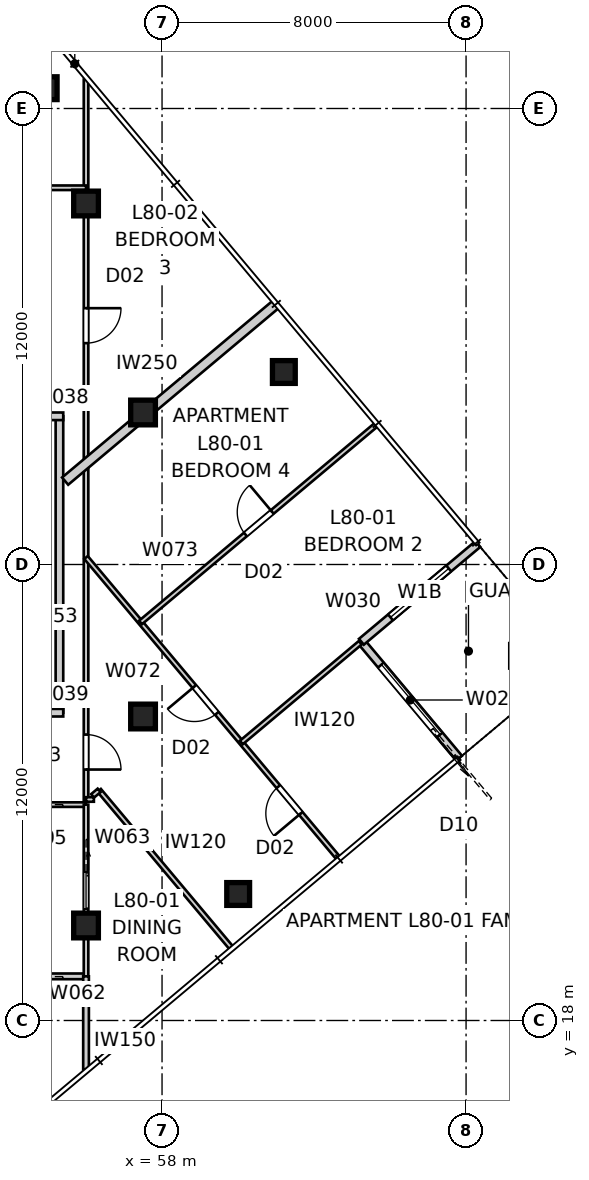
"""IFC4 building model, lengths in metres.
Left out: names, types, materials, properties, quantities, classifications, styles, units other than length and angle.
Written with IfcOpenShell. Run it as: python <this file> out.ifc"""

import sys

from ifc_helpers import new_model, si_unit, direction, frame, frame_2d, origin, origin_2d, place, context, subcontext, project, spatial, rectangle, extrude, element, fill, save


model = new_model("IFC4")
c1 = context("Model", 3, precision=1e-05, world=origin(), true_north=direction((0.0, 1.0)))
c2 = subcontext(c1, "Body", "Model", "MODEL_VIEW")
j1 = project(units=[si_unit("LENGTHUNIT", "METRE"), si_unit("PLANEANGLEUNIT", "RADIAN")], contexts=[c1])
p1 = place(None, origin())
s1 = spatial("IfcSite", under=j1, at=p1, CompositionType="ELEMENT")
p2 = place(p1, origin())
s2 = spatial("IfcBuilding", under=s1, at=p2, CompositionType="ELEMENT")
p3 = place(p2, frame((0.0, 0.0, 289.6)))
s3 = spatial("IfcBuildingStorey", under=s2, at=p3, CompositionType="ELEMENT", Elevation=289.6)
for number, where, z_axis, x_axis in (
    (1, (60.003, 21.329, 0.0), (0.0, 0.0, 1.0), (1.0, 0.0, 0.0)),
    (2, (61.205, 35.065, 0.0), (0.0, 0.0, 1.0), (1.0, 0.0, 0.0)),
    (3, (54.938, 42.534, 0.0), (0.0, 0.0, 1.0), (1.0, 0.0, 0.0)),
):
    element("IfcColumn", number, at=place(p3, frame(where, z_axis=z_axis, x_axis=x_axis)), inside=s3, PredefinedType="COLUMN", context=c2, shape_type="SweptSolid", body=[
        extrude(rectangle(XDim=0.6, YDim=0.6, at=origin_2d()), origin(), (0.0, 0.0, 1.0), 3.4),
    ])
for number, where, z_axis, x_axis in (
    (4, (57.5, 26.0, 0.0), (0.0, 0.0, 1.0), (1.0, 0.0, 0.0)),
    (5, (57.5, 34.0, 0.0), (0.0, 0.0, 1.0), (1.0, 0.0, 0.0)),
    (6, (56.0, 39.5, 0.0), (0.0, 0.0, 1.0), (1.0, 0.0, 0.0)),
    (7, (56.0, 20.5, 0.0), (0.0, 0.0, 1.0), (1.0, 0.0, 0.0)),
):
    element("IfcColumn", number, at=place(p3, frame(where, z_axis=z_axis, x_axis=x_axis)), inside=s3, PredefinedType="COLUMN", context=c2, shape_type="SweptSolid", body=[
        extrude(rectangle(XDim=0.65, YDim=0.65, at=origin_2d()), origin(), (0.0, 0.0, 1.0), 3.4),
    ])
p4 = place(p3, frame((65.817, 24.902, 0.0), z_axis=(0.0, 0.0, 1.0), x_axis=(-0.642768287094, 0.766060656284, 0.0)))
e8 = element("IfcWall", 8, at=p4, inside=s3, PredefinedType="SOLIDWALL", context=c2, shape_type="SweptSolid", body=[
    extrude(rectangle(XDim=4.0, YDim=0.2, at=frame_2d((2.0, 0.0))), origin(), (0.0, 0.0, 1.0), 3.25),
])
p5 = place(p4, frame((0.8, 0.0, 0.0)))
e9 = element("IfcOpeningElement", 9, at=p5, cuts=e8, PredefinedType="OPENING", context=c2, shape_type="SweptSolid", body=[
    extrude(rectangle(XDim=2.4, YDim=2.4, at=frame_2d((1.2, 1.2))), frame((0.0, 0.11, 0.0), z_axis=(0.0, -1.0, 0.0), x_axis=(1.0, 0.0, 0.0)), (0.0, 0.0, 1.0), 0.22),
])
p6 = place(p3, frame((63.246, 27.966, 0.0), z_axis=(0.0, 0.0, 1.0), x_axis=(0.766035437498, 0.642798342015, 0.0)))
e10 = element("IfcWall", 10, at=p6, inside=s3, PredefinedType="SOLIDWALL", context=c2, shape_type="SweptSolid", body=[
    extrude(rectangle(XDim=4.0, YDim=0.2, at=frame_2d((2.0, 0.0))), origin(), (0.0, 0.0, 1.0), 3.25),
])
p7 = place(p6, frame((1.0, 0.0, 0.45)))
e11 = element("IfcOpeningElement", 11, at=p7, cuts=e10, PredefinedType="OPENING", context=c2, shape_type="SweptSolid", body=[
    extrude(rectangle(XDim=2.0, YDim=1.8, at=frame_2d((1.0, 0.9))), frame((0.0, 0.11, 0.0), z_axis=(0.0, -1.0, 0.0), x_axis=(1.0, 0.0, 0.0)), (0.0, 0.0, 1.0), 0.22),
])
p8 = place(p3, frame((55.3, 26.1, 0.0), z_axis=(0.0, 0.0, 1.0), x_axis=(0.0, 1.0, 0.0)))
e12 = element("IfcWall", 12, at=p8, inside=s3, PredefinedType="PARTITIONING", context=c2, shape_type="SweptSolid", body=[
    extrude(rectangle(XDim=7.8, YDim=0.2, at=frame_2d((3.9, 0.0))), origin(), (0.0, 0.0, 1.0), 3.25),
])
p9 = place(p3, frame((52.1, 33.9, 0.0), z_axis=(0.0, 0.0, 1.0), x_axis=(1.0, 0.0, 0.0)))
e13 = element("IfcWall", 13, at=p9, inside=s3, PredefinedType="PARTITIONING", context=c2, shape_type="SweptSolid", body=[
    extrude(rectangle(XDim=3.3, YDim=0.2, at=frame_2d((1.65, 0.0))), origin(), (0.0, 0.0, 1.0), 3.25),
])
p10 = place(p9, frame((1.04, 0.0, 0.0)))
e14 = element("IfcOpeningElement", 14, at=p10, cuts=e13, PredefinedType="OPENING", context=c2, shape_type="SweptSolid", body=[
    extrude(rectangle(XDim=1.02, YDim=2.34, at=frame_2d((0.51, 1.17))), frame((0.0, 0.11, 0.0), z_axis=(0.0, -1.0, 0.0), x_axis=(1.0, 0.0, 0.0)), (0.0, 0.0, 1.0), 0.22),
])
p11 = place(p3, frame((52.1, 26.1, 0.0), z_axis=(0.0, 0.0, 1.0), x_axis=(1.0, 0.0, 0.0)))
e15 = element("IfcWall", 15, at=p11, inside=s3, PredefinedType="PARTITIONING", context=c2, shape_type="SweptSolid", body=[
    extrude(rectangle(XDim=3.3, YDim=0.2, at=frame_2d((1.65, 0.0))), origin(), (0.0, 0.0, 1.0), 3.25),
])
p12 = place(p11, frame((1.04, 0.0, 0.0)))
e16 = element("IfcOpeningElement", 16, at=p12, cuts=e15, PredefinedType="OPENING", context=c2, shape_type="SweptSolid", body=[
    extrude(rectangle(XDim=1.02, YDim=2.34, at=frame_2d((0.51, 1.17))), frame((0.0, 0.11, 0.0), z_axis=(0.0, -1.0, 0.0), x_axis=(1.0, 0.0, 0.0)), (0.0, 0.0, 1.0), 0.22),
])
p13 = place(p3, frame((61.007, 36.857, 0.0), z_axis=(0.0, 0.0, 1.0), x_axis=(-0.766054150891, -0.642776040237, 0.0)))
e17 = element("IfcWall", 17, at=p13, inside=s3, PredefinedType="PARTITIONING", context=c2, shape_type="SweptSolid", body=[
    extrude(rectangle(XDim=7.254, YDim=0.25, at=frame_2d((3.627, 0.0))), origin(), (0.0, 0.0, 1.0), 3.25),
])
p14 = place(p3, frame((56.0, 23.681, 0.0), z_axis=(0.0, 0.0, 1.0), x_axis=(-1.0, 0.0, 0.0)))
e18 = element("IfcWall", 18, at=p14, inside=s3, PredefinedType="PARTITIONING", context=c2, shape_type="SweptSolid", body=[
    extrude(rectangle(XDim=3.9, YDim=0.12, at=frame_2d((1.95, 0.0))), origin(), (0.0, 0.0, 1.0), 3.25),
])
p15 = place(p14, frame((1.47, 0.0, 0.0)))
e19 = element("IfcOpeningElement", 19, at=p15, cuts=e18, PredefinedType="OPENING", context=c2, shape_type="SweptSolid", body=[
    extrude(rectangle(XDim=0.96, YDim=2.1, at=frame_2d((0.48, 1.05))), frame((0.0, 0.07, 0.0), z_axis=(0.0, -1.0, 0.0), x_axis=(1.0, 0.0, 0.0)), (0.0, 0.0, 1.0), 0.14),
])
p16 = place(p3, frame((56.0, 42.762, 0.0), z_axis=(0.0, 0.0, 1.0), x_axis=(0.0, -1.0, 0.0)))
e20 = element("IfcWall", 20, at=p16, inside=s3, PredefinedType="PARTITIONING", context=c2, shape_type="SweptSolid", body=[
    extrude(rectangle(XDim=18.995, YDim=0.12, at=frame_2d((9.498, 0.0))), origin(), (0.0, 0.0, 1.0), 2.55),
])
p17 = place(p16, frame((17.238, 0.0, 0.0)))
e21 = element("IfcOpeningElement", 21, at=p17, cuts=e20, PredefinedType="OPENING", context=c2, shape_type="SweptSolid", body=[
    extrude(rectangle(XDim=0.92, YDim=2.34, at=frame_2d((0.46, 1.17))), frame((0.0, 0.07, 0.0), z_axis=(0.0, -1.0, 0.0), x_axis=(1.0, 0.0, 0.0)), (0.0, 0.0, 1.0), 0.14),
])
p18 = place(p16, frame((6.017, 0.0, 0.0)))
e22 = element("IfcOpeningElement", 22, at=p18, cuts=e20, PredefinedType="OPENING", context=c2, shape_type="SweptSolid", body=[
    extrude(rectangle(XDim=0.92, YDim=2.34, at=frame_2d((0.46, 1.17))), frame((0.0, 0.07, 0.0), z_axis=(0.0, -1.0, 0.0), x_axis=(1.0, 0.0, 0.0)), (0.0, 0.0, 1.0), 0.14),
])
p19 = place(p3, frame((56.0, 19.162, 0.0), z_axis=(0.0, 0.0, 1.0), x_axis=(-1.0, 0.0, 0.0)))
e23 = element("IfcWall", 23, at=p19, inside=s3, PredefinedType="SOLIDWALL", context=c2, shape_type="SweptSolid", body=[
    extrude(rectangle(XDim=3.9, YDim=0.15, at=frame_2d((1.95, 0.0))), origin(), (0.0, 0.0, 1.0), 3.25),
])
p20 = place(p19, frame((1.47, 0.0, 0.0)))
e24 = element("IfcOpeningElement", 24, at=p20, cuts=e23, PredefinedType="OPENING", context=c2, shape_type="SweptSolid", body=[
    extrude(rectangle(XDim=0.96, YDim=2.1, at=frame_2d((0.48, 1.05))), frame((0.0, 0.085, 0.0), z_axis=(0.0, -1.0, 0.0), x_axis=(1.0, 0.0, 0.0)), (0.0, 0.0, 1.0), 0.17),
])
p21 = place(p3, frame((56.0, 23.681, 0.0), z_axis=(0.0, 0.0, 1.0), x_axis=(0.0, -1.0, 0.0)))
e25 = element("IfcWall", 25, at=p21, inside=s3, PredefinedType="PARTITIONING", context=c2, shape_type="SweptSolid", body=[
    extrude(rectangle(XDim=4.519, YDim=0.12, at=frame_2d((2.26, 0.0))), origin(), (0.0, 0.0, 1.0), 2.55),
])
p22 = place(p21, frame((1.78, 0.0, 0.0)))
e26 = element("IfcOpeningElement", 26, at=p22, cuts=e25, PredefinedType="OPENING", context=c2, shape_type="SweptSolid", body=[
    extrude(rectangle(XDim=0.96, YDim=2.1, at=frame_2d((0.48, 1.05))), frame((0.0, 0.07, 0.0), z_axis=(0.0, -1.0, 0.0), x_axis=(1.0, 0.0, 0.0)), (0.0, 0.0, 1.0), 0.14),
])
p23 = place(p3, frame((56.0, 19.162, 0.0), z_axis=(0.0, 0.0, 1.0), x_axis=(0.0, -1.0, 0.0)))
e27 = element("IfcWall", 27, at=p23, inside=s3, PredefinedType="SOLIDWALL", context=c2, shape_type="SweptSolid", body=[
    extrude(rectangle(XDim=2.445, YDim=0.15, at=frame_2d((1.222, 0.0))), origin(), (0.0, 0.0, 1.0), 3.25),
])
p24 = place(p3, frame((62.631, 22.281, 0.0), z_axis=(0.0, 0.0, 1.0), x_axis=(-0.64277851249, 0.766052076481, 0.0)))
e28 = element("IfcWall", 28, at=p24, inside=s3, PredefinedType="PARTITIONING", context=c2, shape_type="SweptSolid", body=[
    extrude(rectangle(XDim=10.316, YDim=0.12, at=frame_2d((5.158, 0.0))), origin(), (0.0, 0.0, 1.0), 3.25),
])
p25 = place(p24, frame((4.962, 0.0, 0.0)))
e29 = element("IfcOpeningElement", 29, at=p25, cuts=e28, PredefinedType="OPENING", context=c2, shape_type="SweptSolid", body=[
    extrude(rectangle(XDim=0.92, YDim=2.34, at=frame_2d((0.46, 1.17))), frame((0.0, 0.07, 0.0), z_axis=(0.0, -1.0, 0.0), x_axis=(1.0, 0.0, 0.0)), (0.0, 0.0, 1.0), 0.14),
])
p26 = place(p24, frame((1.525, 0.0, 0.0)))
e30 = element("IfcOpeningElement", 30, at=p26, cuts=e28, PredefinedType="OPENING", context=c2, shape_type="SweptSolid", body=[
    extrude(rectangle(XDim=0.92, YDim=2.34, at=frame_2d((0.46, 1.17))), frame((0.0, 0.07, 0.0), z_axis=(0.0, -1.0, 0.0), x_axis=(1.0, 0.0, 0.0)), (0.0, 0.0, 1.0), 0.14),
])
p27 = place(p3, frame((57.434, 28.475, 0.0), z_axis=(0.0, 0.0, 1.0), x_axis=(0.766033729027, 0.642800378028, 0.0)))
e31 = element("IfcWall", 31, at=p27, inside=s3, PredefinedType="PARTITIONING", context=c2, shape_type="SweptSolid", body=[
    extrude(rectangle(XDim=8.085, YDim=0.12, at=frame_2d((4.042, 0.0))), origin(), (0.0, 0.0, 1.0), 3.25),
])
p28 = place(p27, frame((3.603, 0.0, 0.0)))
e32 = element("IfcOpeningElement", 32, at=p28, cuts=e31, PredefinedType="OPENING", context=c2, shape_type="SweptSolid", body=[
    extrude(rectangle(XDim=0.92, YDim=2.34, at=frame_2d((0.46, 1.17))), frame((0.0, 0.07, 0.0), z_axis=(0.0, -1.0, 0.0), x_axis=(1.0, 0.0, 0.0)), (0.0, 0.0, 1.0), 0.14),
])
p29 = place(p3, frame((63.215, 27.94, 0.0), z_axis=(0.0, 0.0, 1.0), x_axis=(-0.766036790562, -0.642796729538, 0.0)))
e33 = element("IfcWall", 33, at=p29, inside=s3, PredefinedType="PARTITIONING", context=c2, shape_type="SweptSolid", body=[
    extrude(rectangle(XDim=4.085, YDim=0.12, at=frame_2d((2.042, 0.0))), origin(), (0.0, 0.0, 1.0), 3.25),
])
p30 = place(p3, frame((59.816, 19.919, 0.0), z_axis=(0.0, 0.0, 1.0), x_axis=(-0.642773197476, 0.766056536168, 0.0)))
e34 = element("IfcWall", 34, at=p30, inside=s3, PredefinedType="PARTITIONING", context=c2, shape_type="SweptSolid", body=[
    extrude(rectangle(XDim=5.4, YDim=0.12, at=frame_2d((2.7, 0.0))), origin(), (0.0, 0.0, 1.0), 3.25),
])
p31 = place(p3, frame((56.345, 24.056, 0.0), z_axis=(0.0, 0.0, 1.0), x_axis=(-0.766260492227, -0.642530044474, 0.0)))
e35 = element("IfcWall", 35, at=p31, inside=s3, PredefinedType="PARTITIONING", context=c2, shape_type="SweptSolid", body=[
    extrude(rectangle(XDim=0.225, YDim=0.12, at=frame_2d((0.112, 0.0))), origin(), (0.0, 0.0, 1.0), 3.25),
])
p32 = place(p3, frame((56.207, 23.817, 0.0), z_axis=(0.0, 0.0, 1.0), x_axis=(-1.0, 0.0, 0.0)))
e36 = element("IfcWall", 36, at=p32, inside=s3, PredefinedType="PARTITIONING", context=c2, shape_type="SweptSolid", body=[
    extrude(rectangle(XDim=0.207, YDim=0.12, at=frame_2d((0.104, 0.0))), origin(), (0.0, 0.0, 1.0), 3.25),
])
p33 = place(p3, frame((52.163, 39.914, 0.0), z_axis=(0.0, 0.0, 1.0), x_axis=(1.0, 0.0, 0.0)))
e37 = element("IfcWall", 37, at=p33, inside=s3, PredefinedType="PARTITIONING", context=c2, shape_type="SweptSolid", body=[
    extrude(rectangle(XDim=3.837, YDim=0.12, at=frame_2d((1.918, 0.0))), origin(), (0.0, 0.0, 1.0), 3.25),
])
p34 = place(p33, frame((1.438, 0.0, 0.0)))
e38 = element("IfcOpeningElement", 38, at=p34, cuts=e37, PredefinedType="OPENING", context=c2, shape_type="SweptSolid", body=[
    extrude(rectangle(XDim=0.96, YDim=2.1, at=frame_2d((0.48, 1.05))), frame((0.0, 0.07, 0.0), z_axis=(0.0, -1.0, 0.0), x_axis=(1.0, 0.0, 0.0)), (0.0, 0.0, 1.0), 0.14),
])
p35 = place(p5, origin())
e39 = element("IfcDoor", 39, at=p35, inside=s3, OperationType="SLIDING_TO_LEFT", PredefinedType="DOOR", context=c2, shape_type="SweptSolid", body=[
    extrude(rectangle(XDim=2.4, YDim=2.4, at=frame_2d((1.2, 1.2))), frame((0.0, 0.025, 0.0), z_axis=(0.0, -1.0, 0.0), x_axis=(1.0, 0.0, 0.0)), (0.0, 0.0, 1.0), 0.05),
])
fill(e9, e39)
p36 = place(p7, origin())
e40 = element("IfcWindow", 40, at=p36, inside=s3, PartitioningType="SINGLE_PANEL", PredefinedType="WINDOW", context=c2, shape_type="SweptSolid", body=[
    extrude(rectangle(XDim=2.0, YDim=1.8, at=frame_2d((1.0, 0.9))), frame((0.0, 0.03, 0.0), z_axis=(0.0, -1.0, 0.0), x_axis=(1.0, 0.0, 0.0)), (0.0, 0.0, 1.0), 0.06),
])
fill(e11, e40)
p37 = place(p17, origin())
e41 = element("IfcDoor", 41, at=p37, inside=s3, OperationType="SINGLE_SWING_RIGHT", PredefinedType="DOOR", context=c2, shape_type="SweptSolid", body=[
    extrude(rectangle(XDim=0.92, YDim=2.34, at=frame_2d((0.46, 1.17))), frame((0.0, 0.025, 0.0), z_axis=(0.0, -1.0, 0.0), x_axis=(1.0, 0.0, 0.0)), (0.0, 0.0, 1.0), 0.05),
])
fill(e21, e41)
p38 = place(p18, origin())
e42 = element("IfcDoor", 42, at=p38, inside=s3, OperationType="SINGLE_SWING_LEFT", PredefinedType="DOOR", context=c2, shape_type="SweptSolid", body=[
    extrude(rectangle(XDim=0.92, YDim=2.34, at=frame_2d((0.46, 1.17))), frame((0.0, 0.025, 0.0), z_axis=(0.0, -1.0, 0.0), x_axis=(1.0, 0.0, 0.0)), (0.0, 0.0, 1.0), 0.05),
])
fill(e22, e42)
p39 = place(p22, origin())
e43 = element("IfcDoor", 43, at=p39, inside=s3, OperationType="SLIDING_TO_LEFT", PredefinedType="DOOR", context=c2, shape_type="SweptSolid", body=[
    extrude(rectangle(XDim=0.96, YDim=2.1, at=frame_2d((0.48, 1.05))), frame((0.0, 0.025, 0.0), z_axis=(0.0, -1.0, 0.0), x_axis=(1.0, 0.0, 0.0)), (0.0, 0.0, 1.0), 0.05),
])
fill(e26, e43)
p40 = place(p25, origin())
e44 = element("IfcDoor", 44, at=p40, inside=s3, OperationType="SINGLE_SWING_RIGHT", PredefinedType="DOOR", context=c2, shape_type="SweptSolid", body=[
    extrude(rectangle(XDim=0.92, YDim=2.34, at=frame_2d((0.46, 1.17))), frame((0.0, 0.025, 0.0), z_axis=(0.0, -1.0, 0.0), x_axis=(1.0, 0.0, 0.0)), (0.0, 0.0, 1.0), 0.05),
])
fill(e29, e44)
p41 = place(p26, origin())
e45 = element("IfcDoor", 45, at=p41, inside=s3, OperationType="SINGLE_SWING_LEFT", PredefinedType="DOOR", context=c2, shape_type="SweptSolid", body=[
    extrude(rectangle(XDim=0.92, YDim=2.34, at=frame_2d((0.46, 1.17))), frame((0.0, 0.025, 0.0), z_axis=(0.0, -1.0, 0.0), x_axis=(1.0, 0.0, 0.0)), (0.0, 0.0, 1.0), 0.05),
])
fill(e30, e45)
p42 = place(p28, origin())
e46 = element("IfcDoor", 46, at=p42, inside=s3, OperationType="SINGLE_SWING_RIGHT", PredefinedType="DOOR", context=c2, shape_type="SweptSolid", body=[
    extrude(rectangle(XDim=0.92, YDim=2.34, at=frame_2d((0.46, 1.17))), frame((0.0, 0.025, 0.0), z_axis=(0.0, -1.0, 0.0), x_axis=(1.0, 0.0, 0.0)), (0.0, 0.0, 1.0), 0.05),
])
fill(e32, e46)
save(model, sys.argv[1])
